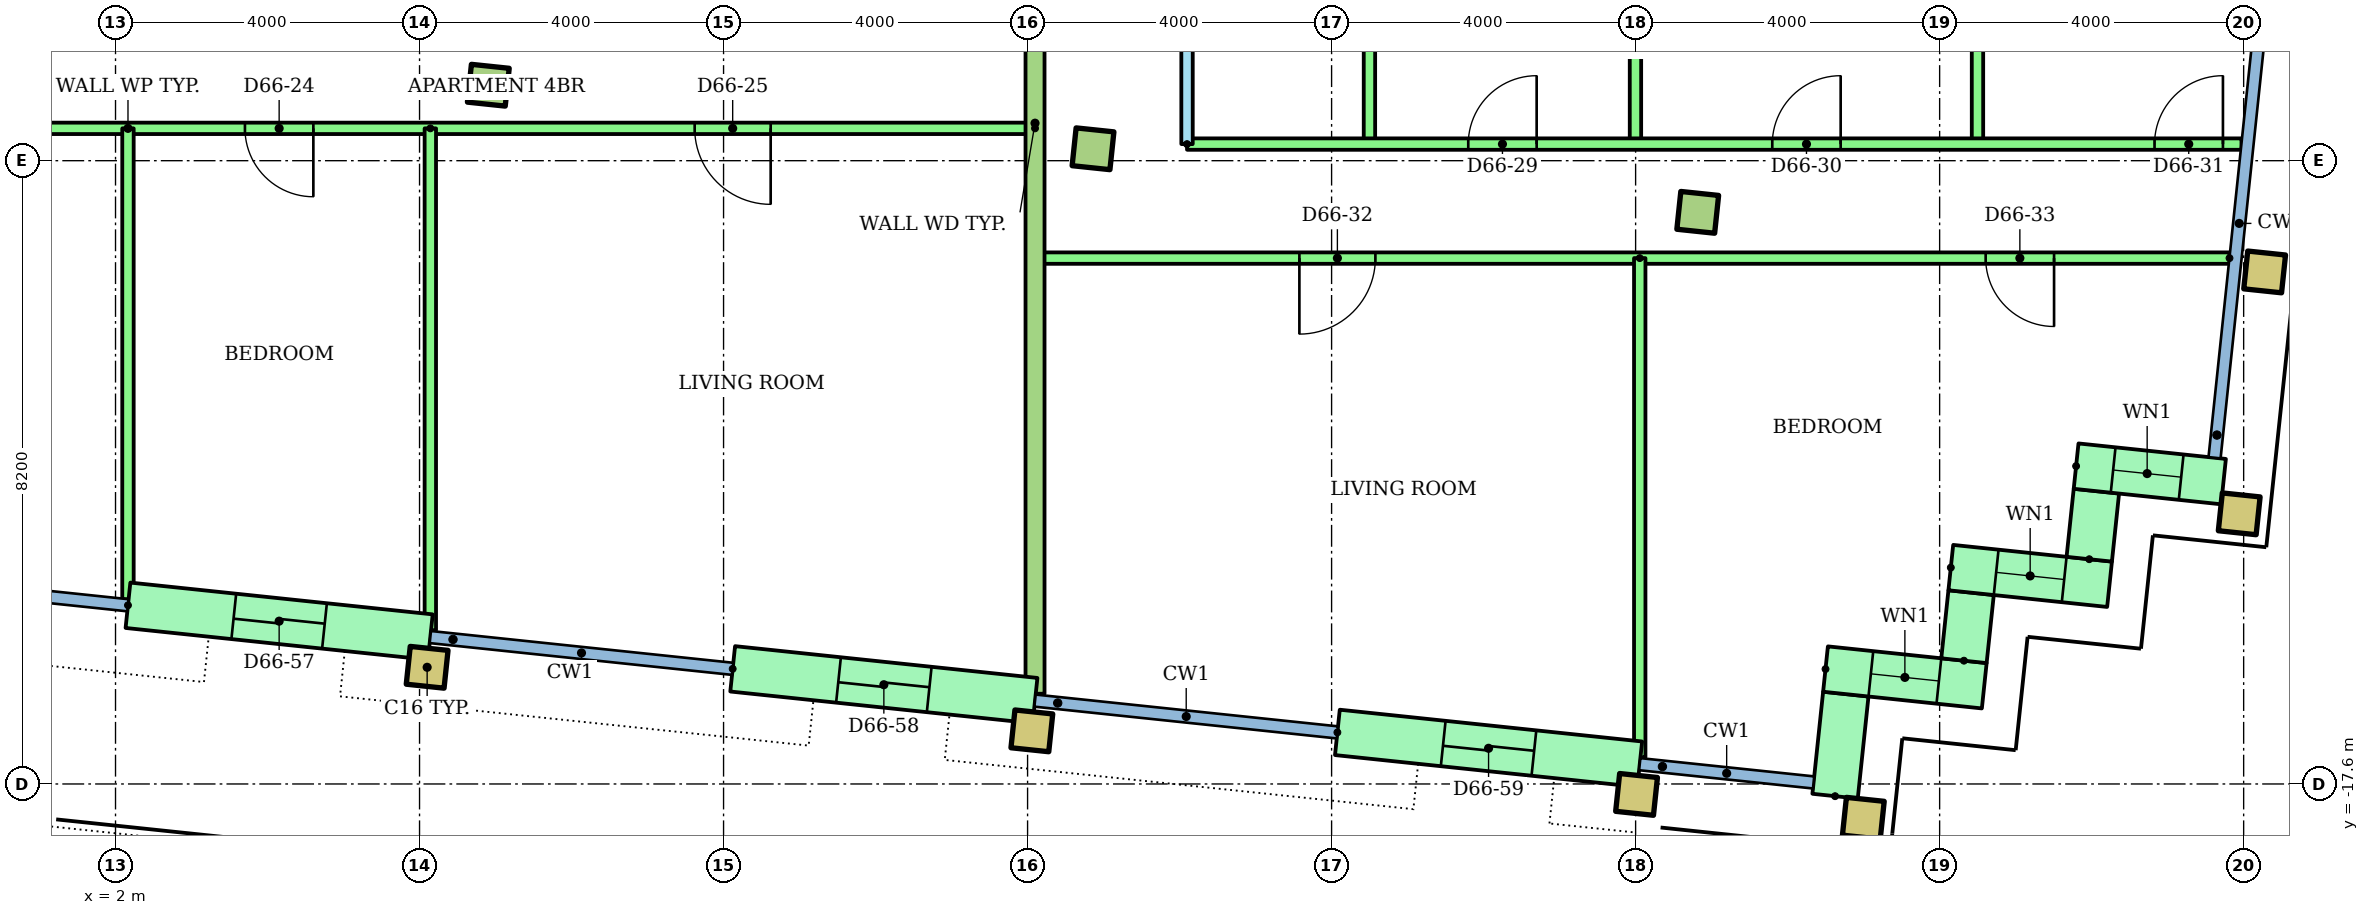
"""IFC4 building model, lengths in metres.
Left out: names, types, materials, properties, quantities, classifications, styles, units other than length and angle.
Written with IfcOpenShell. Run it as: python <this file> out.ifc"""

import sys

from ifc_helpers import new_model, si_unit, direction, frame, frame_2d, origin, origin_2d, place, context, subcontext, project, spatial, rectangle, hollow_rectangle, extrude, element, fill, save


model = new_model("IFC4")
c1 = context("Model", 3, precision=1e-05, world=origin(), true_north=direction((0.0, 1.0)))
c2 = subcontext(c1, "Body", "Model", "MODEL_VIEW")
j1 = project(units=[si_unit("LENGTHUNIT", "METRE"), si_unit("PLANEANGLEUNIT", "RADIAN")], contexts=[c1])
p1 = place(None, origin())
s1 = spatial("IfcSite", under=j1, at=p1, CompositionType="ELEMENT")
p2 = place(p1, origin())
s2 = spatial("IfcBuilding", under=s1, at=p2, CompositionType="ELEMENT")
p3 = place(p2, frame((0.0, 0.0, 256.3)))
s3 = spatial("IfcBuildingStorey", under=s2, at=p3, CompositionType="ELEMENT", Elevation=256.3)
for number, where, z_axis, x_axis in (
    (1, (6.1, -16.065, 0.0), (0.0, 0.0, 1.0), (0.995, -0.105, 0.0)),
    (2, (14.056, -16.901, 0.0), (0.0, 0.0, 1.0), (0.995, -0.105, 0.0)),
    (3, (22.012, -17.737, 0.0), (0.0, 0.0, 1.0), (0.995, -0.105, 0.0)),
    (4, (24.996, -18.051, 0.0), (0.0, 0.0, 1.0), (0.995, -0.105, 0.0)),
    (5, (29.942, -14.046, 0.0), (0.0, 0.0, 1.0), (0.995, -0.105, 0.0)),
):
    element("IfcColumn", number, at=place(p3, frame(where, z_axis=z_axis, x_axis=x_axis)), inside=s3, PredefinedType="COLUMN", context=c2, shape_type="SweptSolid", body=[
        extrude(hollow_rectangle(XDim=0.5, YDim=0.5, WallThickness=0.025, at=origin_2d()), origin(), (0.0, 0.0, 1.0), 3.2),
    ])
for number, where, z_axis, x_axis in (
    (6, (6.905, -8.407, 0.0), (0.0, 0.0, 1.0), (0.995, -0.105, 0.0)),
    (7, (14.861, -9.243, 0.0), (0.0, 0.0, 1.0), (0.995, -0.105, 0.0)),
    (8, (22.817, -10.08, 0.0), (0.0, 0.0, 1.0), (0.995, -0.105, 0.0)),
):
    element("IfcColumn", number, at=place(p3, frame(where, z_axis=z_axis, x_axis=x_axis)), inside=s3, PredefinedType="COLUMN", context=c2, shape_type="SweptSolid", body=[
        extrude(rectangle(XDim=0.5, YDim=0.5, at=origin_2d()), origin(), (0.0, 0.0, 1.0), 3.2),
    ])
p4 = place(p3, frame((30.276, -10.864, 0.0), z_axis=(0.0, 0.0, 1.0), x_axis=(0.994521895368, -0.104528463268, 0.0)))
e9 = element("IfcColumn", 9, at=p4, inside=s3, PredefinedType="COLUMN", context=c2, shape_type="SweptSolid", body=[
    extrude(hollow_rectangle(XDim=0.5, YDim=0.5, WallThickness=0.025, at=origin_2d()), origin(), (0.0, 0.0, 1.0), 3.2),
])
p5 = place(p3, frame((2.164, -15.249, 0.0), z_axis=(0.0, 0.0, 1.0), x_axis=(0.99452550138, -0.104494148666, 0.0)))
e10 = element("IfcWall", 10, at=p5, inside=s3, PredefinedType="STANDARD", context=c2, shape_type="SweptSolid", body=[
    extrude(rectangle(XDim=4.0, YDim=0.6, at=frame_2d((2.0, 0.0))), origin(), (0.0, 0.0, 1.0), 2.92),
])
p6 = place(p5, frame((1.4, 0.0, 0.0)))
e11 = element("IfcOpeningElement", 11, at=p6, cuts=e10, PredefinedType="OPENING", context=c2, shape_type="SweptSolid", body=[
    extrude(rectangle(XDim=1.2, YDim=2.1, at=frame_2d((0.6, 1.05))), frame((0.0, 0.31, 0.0), z_axis=(0.0, -1.0, 0.0), x_axis=(1.0, 0.0, 0.0)), (0.0, 0.0, 1.0), 0.62),
])
p7 = place(p3, frame((10.12, -16.085, 0.0), z_axis=(0.0, 0.0, 1.0), x_axis=(0.994519156568, -0.104554517933, 0.0)))
e12 = element("IfcWall", 12, at=p7, inside=s3, PredefinedType="STANDARD", context=c2, shape_type="SweptSolid", body=[
    extrude(rectangle(XDim=4.0, YDim=0.6, at=frame_2d((2.0, 0.0))), origin(), (0.0, 0.0, 1.0), 2.92),
])
p8 = place(p7, frame((1.4, 0.0, 0.0)))
e13 = element("IfcOpeningElement", 13, at=p8, cuts=e12, PredefinedType="OPENING", context=c2, shape_type="SweptSolid", body=[
    extrude(rectangle(XDim=1.2, YDim=2.1, at=frame_2d((0.6, 1.05))), frame((0.0, 0.31, 0.0), z_axis=(0.0, -1.0, 0.0), x_axis=(1.0, 0.0, 0.0)), (0.0, 0.0, 1.0), 0.62),
])
p9 = place(p3, frame((18.076, -16.921, 0.0), z_axis=(0.0, 0.0, 1.0), x_axis=(0.994519156568, -0.104554517933, 0.0)))
e14 = element("IfcWall", 14, at=p9, inside=s3, PredefinedType="STANDARD", context=c2, shape_type="SweptSolid", body=[
    extrude(rectangle(XDim=4.0, YDim=0.6, at=frame_2d((2.0, 0.0))), origin(), (0.0, 0.0, 1.0), 2.92),
])
p10 = place(p9, frame((1.4, 0.0, 0.0)))
e15 = element("IfcOpeningElement", 15, at=p10, cuts=e14, PredefinedType="OPENING", context=c2, shape_type="SweptSolid", body=[
    extrude(rectangle(XDim=1.2, YDim=2.1, at=frame_2d((0.6, 1.05))), frame((0.0, 0.31, 0.0), z_axis=(0.0, -1.0, 0.0), x_axis=(1.0, 0.0, 0.0)), (0.0, 0.0, 1.0), 0.62),
])
p11 = place(p3, frame((24.625, -17.76, 0.0), z_axis=(0.0, 0.0, 1.0), x_axis=(0.104355269718, 0.994540083497, 0.0)))
e16 = element("IfcWall", 16, at=p11, inside=s3, PredefinedType="STANDARD", context=c2, shape_type="SweptSolid", body=[
    extrude(rectangle(XDim=1.35, YDim=0.6, at=frame_2d((0.675, 0.0))), origin(), (0.0, 0.0, 1.0), 2.92),
])
p12 = place(p3, frame((24.499, -16.088, 0.0), z_axis=(0.0, 0.0, 1.0), x_axis=(0.994522640205, -0.104521376379, 0.0)))
e17 = element("IfcWall", 17, at=p12, inside=s3, PredefinedType="STANDARD", context=c2, shape_type="SweptSolid", body=[
    extrude(rectangle(XDim=2.1, YDim=0.6, at=frame_2d((1.05, 0.0))), origin(), (0.0, 0.0, 1.0), 2.92),
])
p13 = place(p12, frame((0.6, 0.0, 0.9)))
e18 = element("IfcOpeningElement", 18, at=p13, cuts=e17, PredefinedType="OPENING", context=c2, shape_type="SweptSolid", body=[
    extrude(rectangle(XDim=0.9, YDim=1.5, at=frame_2d((0.45, 0.75))), frame((0.0, 0.31, 0.0), z_axis=(0.0, -1.0, 0.0), x_axis=(1.0, 0.0, 0.0)), (0.0, 0.0, 1.0), 0.62),
])
p14 = place(p3, frame((26.32, -15.978, 0.0), z_axis=(0.0, 0.0, 1.0), x_axis=(0.104444712852, 0.994530694326, 0.0)))
e19 = element("IfcWall", 19, at=p14, inside=s3, PredefinedType="STANDARD", context=c2, shape_type="SweptSolid", body=[
    extrude(rectangle(XDim=0.9, YDim=0.6, at=frame_2d((0.45, 0.0))), origin(), (0.0, 0.0, 1.0), 2.92),
])
p15 = place(p3, frame((26.147, -14.753, 0.0), z_axis=(0.0, 0.0, 1.0), x_axis=(0.994522640205, -0.104521376379, 0.0)))
e20 = element("IfcWall", 20, at=p15, inside=s3, PredefinedType="STANDARD", context=c2, shape_type="SweptSolid", body=[
    extrude(rectangle(XDim=2.1, YDim=0.6, at=frame_2d((1.05, 0.0))), origin(), (0.0, 0.0, 1.0), 2.92),
])
p16 = place(p15, frame((0.6, 0.0, 0.9)))
e21 = element("IfcOpeningElement", 21, at=p16, cuts=e20, PredefinedType="OPENING", context=c2, shape_type="SweptSolid", body=[
    extrude(rectangle(XDim=0.9, YDim=1.5, at=frame_2d((0.45, 0.75))), frame((0.0, 0.31, 0.0), z_axis=(0.0, -1.0, 0.0), x_axis=(1.0, 0.0, 0.0)), (0.0, 0.0, 1.0), 0.62),
])
p17 = place(p3, frame((27.969, -14.643, 0.0), z_axis=(0.0, 0.0, 1.0), x_axis=(0.104416541099, 0.994533652495, 0.0)))
e22 = element("IfcWall", 22, at=p17, inside=s3, PredefinedType="STANDARD", context=c2, shape_type="SweptSolid", body=[
    extrude(rectangle(XDim=0.9, YDim=0.6, at=frame_2d((0.45, 0.0))), origin(), (0.0, 0.0, 1.0), 2.92),
])
p18 = place(p3, frame((27.796, -13.418, 0.0), z_axis=(0.0, 0.0, 1.0), x_axis=(0.994519850893, -0.104547913319, 0.0)))
e23 = element("IfcWall", 23, at=p18, inside=s3, PredefinedType="STANDARD", context=c2, shape_type="SweptSolid", body=[
    extrude(rectangle(XDim=1.95, YDim=0.6, at=frame_2d((0.975, 0.0))), origin(), (0.0, 0.0, 1.0), 2.92),
])
p19 = place(p18, frame((0.49, 0.0, 0.9)))
e24 = element("IfcOpeningElement", 24, at=p19, cuts=e23, PredefinedType="OPENING", context=c2, shape_type="SweptSolid", body=[
    extrude(rectangle(XDim=0.9, YDim=1.5, at=frame_2d((0.45, 0.75))), frame((0.0, 0.31, 0.0), z_axis=(0.0, -1.0, 0.0), x_axis=(1.0, 0.0, 0.0)), (0.0, 0.0, 1.0), 0.62),
])
p20 = place(p3, frame((14.098, -8.975, 0.0), z_axis=(0.0, 0.0, 1.0), x_axis=(-1.0, 0.0, 0.0)))
e25 = element("IfcWall", 25, at=p20, inside=s3, PredefinedType="PARTITIONING", context=c2, shape_type="SweptSolid", body=[
    extrude(rectangle(XDim=23.868, YDim=0.15, at=frame_2d((11.934, 0.0))), origin(), (0.0, 0.0, 1.0), 2.4),
])
p21 = place(p20, frame((21.429, 0.0, 0.0)))
e26 = element("IfcOpeningElement", 26, at=p21, cuts=e25, PredefinedType="OPENING", context=c2, shape_type="SweptSolid", body=[
    extrude(rectangle(XDim=0.9, YDim=2.1, at=frame_2d((0.45, 1.05))), frame((0.0, 0.085, 0.0), z_axis=(0.0, -1.0, 0.0), x_axis=(1.0, 0.0, 0.0)), (0.0, 0.0, 1.0), 0.17),
])
p22 = place(p20, frame((17.451, 0.0, 0.0)))
e27 = element("IfcOpeningElement", 27, at=p22, cuts=e25, PredefinedType="OPENING", context=c2, shape_type="SweptSolid", body=[
    extrude(rectangle(XDim=0.9, YDim=2.1, at=frame_2d((0.45, 1.05))), frame((0.0, 0.085, 0.0), z_axis=(0.0, -1.0, 0.0), x_axis=(1.0, 0.0, 0.0)), (0.0, 0.0, 1.0), 0.17),
])
p23 = place(p20, frame((13.473, 0.0, 0.0)))
e28 = element("IfcOpeningElement", 28, at=p23, cuts=e25, PredefinedType="OPENING", context=c2, shape_type="SweptSolid", body=[
    extrude(rectangle(XDim=0.9, YDim=2.1, at=frame_2d((0.45, 1.05))), frame((0.0, 0.085, 0.0), z_axis=(0.0, -1.0, 0.0), x_axis=(1.0, 0.0, 0.0)), (0.0, 0.0, 1.0), 0.17),
])
p24 = place(p20, frame((9.495, 0.0, 0.0)))
e29 = element("IfcOpeningElement", 29, at=p24, cuts=e25, PredefinedType="OPENING", context=c2, shape_type="SweptSolid", body=[
    extrude(rectangle(XDim=0.9, YDim=2.1, at=frame_2d((0.45, 1.05))), frame((0.0, 0.085, 0.0), z_axis=(0.0, -1.0, 0.0), x_axis=(1.0, 0.0, 0.0)), (0.0, 0.0, 1.0), 0.17),
])
p25 = place(p20, frame((3.478, 0.0, 0.0)))
e30 = element("IfcOpeningElement", 30, at=p25, cuts=e25, PredefinedType="OPENING", context=c2, shape_type="SweptSolid", body=[
    extrude(rectangle(XDim=1.0, YDim=2.1, at=frame_2d((0.5, 1.05))), frame((0.0, 0.085, 0.0), z_axis=(0.0, -1.0, 0.0), x_axis=(1.0, 0.0, 0.0)), (0.0, 0.0, 1.0), 0.17),
])
p26 = place(p3, frame((2.164, -8.975, 0.0), z_axis=(0.0, 0.0, 1.0), x_axis=(0.0, -1.0, 0.0)))
e31 = element("IfcWall", 31, at=p26, inside=s3, PredefinedType="PARTITIONING", context=c2, shape_type="SweptSolid", body=[
    extrude(rectangle(XDim=6.195, YDim=0.15, at=frame_2d((3.097, 0.0))), origin(), (0.0, 0.0, 1.0), 2.4),
])
p27 = place(p3, frame((6.142, -8.975, 0.0), z_axis=(0.0, 0.0, 1.0), x_axis=(0.0, -1.0, 0.0)))
e32 = element("IfcWall", 32, at=p27, inside=s3, PredefinedType="PARTITIONING", context=c2, shape_type="SweptSolid", body=[
    extrude(rectangle(XDim=6.602, YDim=0.15, at=frame_2d((3.301, 0.0))), origin(), (0.0, 0.0, 1.0), 2.4),
])
p28 = place(p3, frame((16.098, -1.4, 0.0), z_axis=(0.0, 0.0, 1.0), x_axis=(0.0, -1.0, 0.0)))
e33 = element("IfcWall", 33, at=p28, inside=s3, PredefinedType="PARTITIONING", context=c2, shape_type="SweptSolid", body=[
    extrude(rectangle(XDim=7.782, YDim=0.15, at=frame_2d((3.891, 0.0))), origin(), (0.0, 0.0, 1.0), 2.4),
])
p29 = place(p28, frame((1.675, 0.0, 0.0)))
e34 = element("IfcOpeningElement", 34, at=p29, cuts=e33, PredefinedType="OPENING", context=c2, shape_type="SweptSolid", body=[
    extrude(rectangle(XDim=0.9, YDim=2.1, at=frame_2d((0.45, 1.05))), frame((0.0, 0.085, 0.0), z_axis=(0.0, -1.0, 0.0), x_axis=(1.0, 0.0, 0.0)), (0.0, 0.0, 1.0), 0.17),
])
p30 = place(p28, frame((5.616, 0.0, 0.0)))
e35 = element("IfcOpeningElement", 35, at=p30, cuts=e33, PredefinedType="OPENING", context=c2, shape_type="SweptSolid", body=[
    extrude(rectangle(XDim=0.8, YDim=2.1, at=frame_2d((0.4, 1.05))), frame((0.0, 0.085, 0.0), z_axis=(0.0, -1.0, 0.0), x_axis=(1.0, 0.0, 0.0)), (0.0, 0.0, 1.0), 0.17),
])
for number, where, z_axis, x_axis in (
    (36, (18.498, -1.4, 0.0), (0.0, 0.0, 1.0), (0.0, -1.0, 0.0)),
    (37, (21.998, -1.4, 0.0), (0.0, 0.0, 1.0), (0.0, -1.0, 0.0)),
    (38, (26.498, -1.4, 0.0), (0.0, 0.0, 1.0), (0.0, -1.0, 0.0)),
):
    element("IfcWall", number, at=place(p3, frame(where, z_axis=z_axis, x_axis=x_axis)), inside=s3, PredefinedType="PARTITIONING", context=c2, shape_type="SweptSolid", body=[
        extrude(rectangle(XDim=7.782, YDim=0.15, at=frame_2d((3.891, 0.0))), origin(), (0.0, 0.0, 1.0), 2.4),
    ])
p31 = place(p3, frame((16.098, -9.182, 0.0)))
e39 = element("IfcWall", 39, at=p31, inside=s3, PredefinedType="PARTITIONING", context=c2, shape_type="SweptSolid", body=[
    extrude(rectangle(XDim=13.873, YDim=0.15, at=frame_2d((6.937, 0.0))), origin(), (0.0, 0.0, 1.0), 2.4),
])
p32 = place(p31, frame((3.7, 0.0, 0.0)))
e40 = element("IfcOpeningElement", 40, at=p32, cuts=e39, PredefinedType="OPENING", context=c2, shape_type="SweptSolid", body=[
    extrude(rectangle(XDim=0.9, YDim=2.1, at=frame_2d((0.45, 1.05))), frame((0.0, 0.085, 0.0), z_axis=(0.0, -1.0, 0.0), x_axis=(1.0, 0.0, 0.0)), (0.0, 0.0, 1.0), 0.17),
])
p33 = place(p31, frame((7.7, 0.0, 0.0)))
e41 = element("IfcOpeningElement", 41, at=p33, cuts=e39, PredefinedType="OPENING", context=c2, shape_type="SweptSolid", body=[
    extrude(rectangle(XDim=0.9, YDim=2.1, at=frame_2d((0.45, 1.05))), frame((0.0, 0.085, 0.0), z_axis=(0.0, -1.0, 0.0), x_axis=(1.0, 0.0, 0.0)), (0.0, 0.0, 1.0), 0.17),
])
p34 = place(p31, frame((12.729, 0.0, 0.0)))
e42 = element("IfcOpeningElement", 42, at=p34, cuts=e39, PredefinedType="OPENING", context=c2, shape_type="SweptSolid", body=[
    extrude(rectangle(XDim=0.9, YDim=2.1, at=frame_2d((0.45, 1.05))), frame((0.0, 0.085, 0.0), z_axis=(0.0, -1.0, 0.0), x_axis=(1.0, 0.0, 0.0)), (0.0, 0.0, 1.0), 0.17),
])
p35 = place(p3, frame((29.814, -10.682, 0.0), z_axis=(0.0, 0.0, 1.0), x_axis=(-1.0, 0.0, 0.0)))
e43 = element("IfcWall", 43, at=p35, inside=s3, PredefinedType="PARTITIONING", context=c2, shape_type="SweptSolid", body=[
    extrude(rectangle(XDim=15.716, YDim=0.15, at=frame_2d((7.858, 0.0))), origin(), (0.0, 0.0, 1.0), 2.4),
])
p36 = place(p35, frame((11.238, 0.0, 0.0)))
e44 = element("IfcOpeningElement", 44, at=p36, cuts=e43, PredefinedType="OPENING", context=c2, shape_type="SweptSolid", body=[
    extrude(rectangle(XDim=1.0, YDim=2.1, at=frame_2d((0.5, 1.05))), frame((0.0, 0.085, 0.0), z_axis=(0.0, -1.0, 0.0), x_axis=(1.0, 0.0, 0.0)), (0.0, 0.0, 1.0), 0.17),
])
p37 = place(p35, frame((2.308, 0.0, 0.0)))
e45 = element("IfcOpeningElement", 45, at=p37, cuts=e43, PredefinedType="OPENING", context=c2, shape_type="SweptSolid", body=[
    extrude(rectangle(XDim=0.9, YDim=2.1, at=frame_2d((0.45, 1.05))), frame((0.0, 0.085, 0.0), z_axis=(0.0, -1.0, 0.0), x_axis=(1.0, 0.0, 0.0)), (0.0, 0.0, 1.0), 0.17),
])
p38 = place(p3, frame((22.054, -10.682, 0.0), z_axis=(0.0, 0.0, 1.0), x_axis=(0.0, -1.0, 0.0)))
e46 = element("IfcWall", 46, at=p38, inside=s3, PredefinedType="PARTITIONING", context=c2, shape_type="SweptSolid", body=[
    extrude(rectangle(XDim=6.567, YDim=0.15, at=frame_2d((3.284, 0.0))), origin(), (0.0, 0.0, 1.0), 2.4),
])
p39 = place(p3, frame((14.098, -1.4, 0.0), z_axis=(0.0, 0.0, 1.0), x_axis=(0.0, -1.0, 0.0)))
e47 = element("IfcWall", 47, at=p39, inside=s3, PredefinedType="PARTITIONING", context=c2, shape_type="SweptSolid", body=[
    extrude(rectangle(XDim=15.013, YDim=0.25, at=frame_2d((7.506, 0.0))), origin(), (0.0, 0.0, 1.0), 2.4),
])
p40 = place(p13, origin())
e48 = element("IfcWindow", 48, at=p40, inside=s3, PartitioningType="SINGLE_PANEL", PredefinedType="WINDOW", context=c2, shape_type="SweptSolid", body=[
    extrude(rectangle(XDim=0.9, YDim=1.5, at=frame_2d((0.45, 0.75))), frame((0.0, 0.03, 0.0), z_axis=(0.0, -1.0, 0.0), x_axis=(1.0, 0.0, 0.0)), (0.0, 0.0, 1.0), 0.06),
])
fill(e18, e48)
p41 = place(p16, origin())
e49 = element("IfcWindow", 49, at=p41, inside=s3, PartitioningType="SINGLE_PANEL", PredefinedType="WINDOW", context=c2, shape_type="SweptSolid", body=[
    extrude(rectangle(XDim=0.9, YDim=1.5, at=frame_2d((0.45, 0.75))), frame((0.0, 0.03, 0.0), z_axis=(0.0, -1.0, 0.0), x_axis=(1.0, 0.0, 0.0)), (0.0, 0.0, 1.0), 0.06),
])
fill(e21, e49)
p42 = place(p19, origin())
e50 = element("IfcWindow", 50, at=p42, inside=s3, PartitioningType="SINGLE_PANEL", PredefinedType="WINDOW", context=c2, shape_type="SweptSolid", body=[
    extrude(rectangle(XDim=0.9, YDim=1.5, at=frame_2d((0.45, 0.75))), frame((0.0, 0.03, 0.0), z_axis=(0.0, -1.0, 0.0), x_axis=(1.0, 0.0, 0.0)), (0.0, 0.0, 1.0), 0.06),
])
fill(e24, e50)
p43 = place(p24, origin())
e51 = element("IfcDoor", 51, at=p43, inside=s3, OperationType="SINGLE_SWING_LEFT", PredefinedType="DOOR", context=c2, shape_type="SweptSolid", body=[
    extrude(rectangle(XDim=0.9, YDim=2.1, at=frame_2d((0.45, 1.05))), frame((0.0, 0.025, 0.0), z_axis=(0.0, -1.0, 0.0), x_axis=(1.0, 0.0, 0.0)), (0.0, 0.0, 1.0), 0.05),
])
fill(e29, e51)
p44 = place(p25, origin())
e52 = element("IfcDoor", 52, at=p44, inside=s3, OperationType="SINGLE_SWING_LEFT", PredefinedType="DOOR", context=c2, shape_type="SweptSolid", body=[
    extrude(rectangle(XDim=1.0, YDim=2.1, at=frame_2d((0.5, 1.05))), frame((0.0, 0.025, 0.0), z_axis=(0.0, -1.0, 0.0), x_axis=(1.0, 0.0, 0.0)), (0.0, 0.0, 1.0), 0.05),
])
fill(e30, e52)
p45 = place(p32, origin())
e53 = element("IfcDoor", 53, at=p45, inside=s3, OperationType="SINGLE_SWING_RIGHT", PredefinedType="DOOR", context=c2, shape_type="SweptSolid", body=[
    extrude(rectangle(XDim=0.9, YDim=2.1, at=frame_2d((0.45, 1.05))), frame((0.0, 0.025, 0.0), z_axis=(0.0, -1.0, 0.0), x_axis=(1.0, 0.0, 0.0)), (0.0, 0.0, 1.0), 0.05),
])
fill(e40, e53)
p46 = place(p33, origin())
e54 = element("IfcDoor", 54, at=p46, inside=s3, OperationType="SINGLE_SWING_RIGHT", PredefinedType="DOOR", context=c2, shape_type="SweptSolid", body=[
    extrude(rectangle(XDim=0.9, YDim=2.1, at=frame_2d((0.45, 1.05))), frame((0.0, 0.025, 0.0), z_axis=(0.0, -1.0, 0.0), x_axis=(1.0, 0.0, 0.0)), (0.0, 0.0, 1.0), 0.05),
])
fill(e41, e54)
p47 = place(p34, origin())
e55 = element("IfcDoor", 55, at=p47, inside=s3, OperationType="SINGLE_SWING_RIGHT", PredefinedType="DOOR", context=c2, shape_type="SweptSolid", body=[
    extrude(rectangle(XDim=0.9, YDim=2.1, at=frame_2d((0.45, 1.05))), frame((0.0, 0.025, 0.0), z_axis=(0.0, -1.0, 0.0), x_axis=(1.0, 0.0, 0.0)), (0.0, 0.0, 1.0), 0.05),
])
fill(e42, e55)
p48 = place(p36, origin())
e56 = element("IfcDoor", 56, at=p48, inside=s3, OperationType="SINGLE_SWING_RIGHT", PredefinedType="DOOR", context=c2, shape_type="SweptSolid", body=[
    extrude(rectangle(XDim=1.0, YDim=2.1, at=frame_2d((0.5, 1.05))), frame((0.0, 0.025, 0.0), z_axis=(0.0, -1.0, 0.0), x_axis=(1.0, 0.0, 0.0)), (0.0, 0.0, 1.0), 0.05),
])
fill(e44, e56)
p49 = place(p37, origin())
e57 = element("IfcDoor", 57, at=p49, inside=s3, OperationType="SINGLE_SWING_LEFT", PredefinedType="DOOR", context=c2, shape_type="SweptSolid", body=[
    extrude(rectangle(XDim=0.9, YDim=2.1, at=frame_2d((0.45, 1.05))), frame((0.0, 0.025, 0.0), z_axis=(0.0, -1.0, 0.0), x_axis=(1.0, 0.0, 0.0)), (0.0, 0.0, 1.0), 0.05),
])
fill(e45, e57)
p50 = place(p6, origin())
e58 = element("IfcDoor", 58, at=p50, inside=s3, OperationType="SLIDING_TO_LEFT", PredefinedType="DOOR", context=c2, shape_type="SweptSolid", body=[
    extrude(rectangle(XDim=1.2, YDim=2.1, at=frame_2d((0.6, 1.05))), frame((0.0, 0.025, 0.0), z_axis=(0.0, -1.0, 0.0), x_axis=(1.0, 0.0, 0.0)), (0.0, 0.0, 1.0), 0.05),
])
fill(e11, e58)
p51 = place(p8, origin())
e59 = element("IfcDoor", 59, at=p51, inside=s3, OperationType="SLIDING_TO_LEFT", PredefinedType="DOOR", context=c2, shape_type="SweptSolid", body=[
    extrude(rectangle(XDim=1.2, YDim=2.1, at=frame_2d((0.6, 1.05))), frame((0.0, 0.025, 0.0), z_axis=(0.0, -1.0, 0.0), x_axis=(1.0, 0.0, 0.0)), (0.0, 0.0, 1.0), 0.05),
])
fill(e13, e59)
p52 = place(p10, origin())
e60 = element("IfcDoor", 60, at=p52, inside=s3, OperationType="SLIDING_TO_LEFT", PredefinedType="DOOR", context=c2, shape_type="SweptSolid", body=[
    extrude(rectangle(XDim=1.2, YDim=2.1, at=frame_2d((0.6, 1.05))), frame((0.0, 0.025, 0.0), z_axis=(0.0, -1.0, 0.0), x_axis=(1.0, 0.0, 0.0)), (0.0, 0.0, 1.0), 0.05),
])
fill(e15, e60)
save(model, sys.argv[1])
